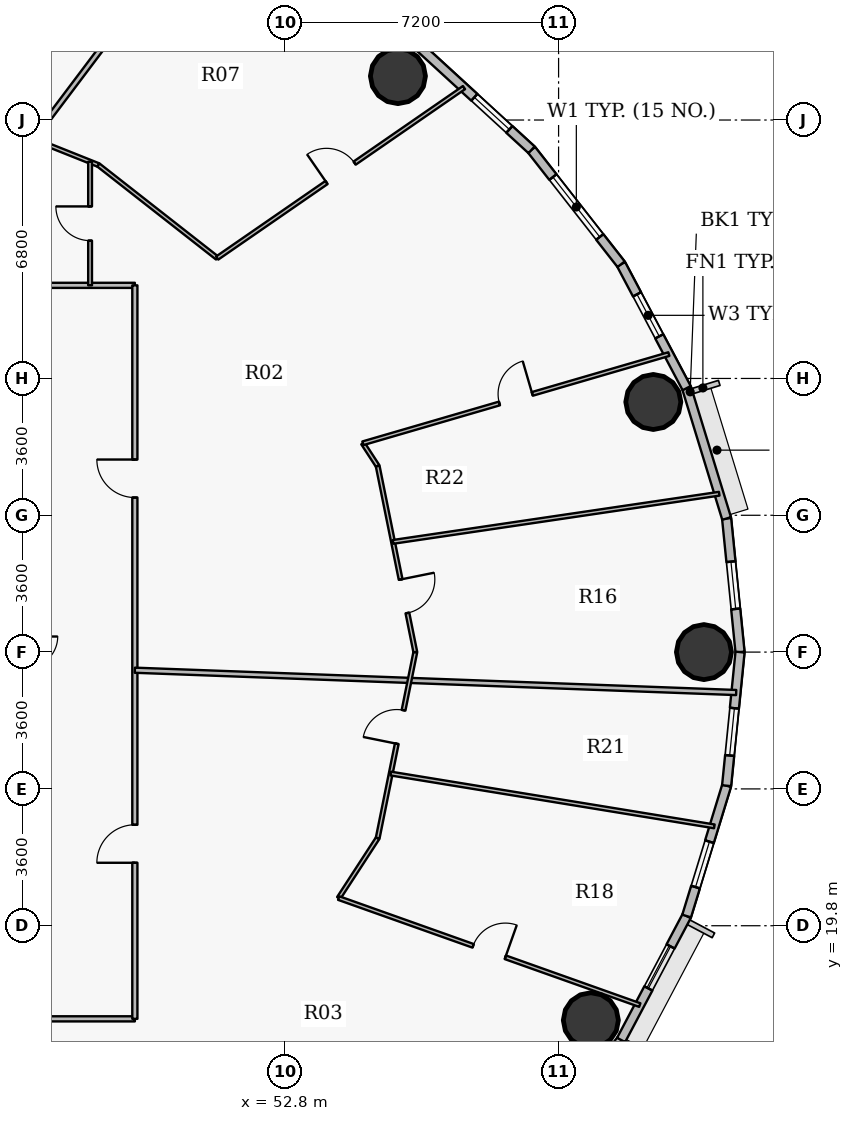
"""IFC4 building model, lengths in metres.
Left out: names, types, materials, properties, quantities, classifications, styles, units other than length and angle.
Written with IfcOpenShell. Run it as: python <this file> out.ifc"""

import sys

from ifc_helpers import new_model, si_unit, direction, frame, frame_2d, origin, origin_2d, place, context, subcontext, project, spatial, rectangle, hollow_circle, extrude, source, transform, mapped, element, fill, save


model = new_model("IFC4")
c1 = context("Model", 3, precision=1e-05, world=origin(), true_north=direction((0.0, 1.0)))
c2 = subcontext(c1, "Body", "Model", "MODEL_VIEW")
j1 = project(units=[si_unit("LENGTHUNIT", "METRE"), si_unit("PLANEANGLEUNIT", "RADIAN")], contexts=[c1])
p1 = place(None, origin())
s1 = spatial("IfcSite", under=j1, at=p1, CompositionType="ELEMENT")
p2 = place(p1, origin())
s2 = spatial("IfcBuilding", under=s1, at=p2, CompositionType="ELEMENT")
p3 = place(p2, frame((0.0, 0.0, 108.45)))
s3 = spatial("IfcBuildingStorey", under=s2, at=p3, CompositionType="ELEMENT", Elevation=108.45)
for number, where, z_axis, x_axis in (
    (1, (63.825, 27.0, 0.0), (0.0, 0.0, 1.0), (1.0, 0.0, 0.0)),
    (2, (62.493, 33.581, 0.0), (0.0, 0.0, 1.0), (1.0, 0.0, 0.0)),
    (3, (55.773, 42.156, 0.0), (0.0, 0.0, 1.0), (1.0, 0.0, 0.0)),
    (4, (60.849, 17.312, 0.0), (0.0, 0.0, 1.0), (1.0, 0.0, 0.0)),
):
    element("IfcColumn", number, at=place(p3, frame(where, z_axis=z_axis, x_axis=x_axis)), inside=s3, PredefinedType="COLUMN", context=c2, shape_type="SweptSolid", body=[
        extrude(hollow_circle(Radius=0.725, WallThickness=0.042, at=origin_2d()), origin(), (0.0, 0.0, 1.0), 3.75),
    ])
p4 = place(p3, frame((64.422, 30.515, 0.0), z_axis=(0.0, 0.0, 1.0), x_axis=(0.099989468229, -0.994988495533, 0.0)))
e5 = element("IfcWall", 5, at=p4, inside=s3, PredefinedType="SOLIDWALL", context=c2, shape_type="SweptSolid", body=[
    extrude(rectangle(XDim=3.533, YDim=0.24, at=frame_2d((1.767, 0.0))), origin(), (0.0, 0.0, 1.0), 3.5),
])
p5 = place(p4, frame((1.142, 0.0, 0.9)))
e6 = element("IfcOpeningElement", 6, at=p5, cuts=e5, PredefinedType="OPENING", context=c2, shape_type="SweptSolid", body=[
    extrude(rectangle(XDim=1.25, YDim=1.65, at=origin_2d()), frame((0.625, 0.13, 0.825), z_axis=(0.0, -1.0, 0.0), x_axis=(1.0, 0.0, 0.0)), (0.0, 0.0, 1.0), 0.26),
])
p6 = place(p3, frame((63.37, 33.945, 0.0), z_axis=(0.0, 0.0, 1.0), x_axis=(0.293124431344, -0.956074300329, 0.0)))
e7 = element("IfcWall", 7, at=p6, inside=s3, PredefinedType="SOLIDWALL", context=c2, shape_type="SweptSolid", body=[
    extrude(rectangle(XDim=3.587, YDim=0.24, at=frame_2d((1.793, 0.0))), origin(), (0.0, 0.0, 1.0), 3.5),
])
p7 = place(p3, frame((61.645, 37.206, 0.0), z_axis=(0.0, 0.0, 1.0), x_axis=(0.467614004126, -0.883932770716, 0.0)))
e8 = element("IfcWall", 8, at=p7, inside=s3, PredefinedType="SOLIDWALL", context=c2, shape_type="SweptSolid", body=[
    extrude(rectangle(XDim=3.689, YDim=0.24, at=frame_2d((1.844, 0.0))), origin(), (0.0, 0.0, 1.0), 3.5),
])
p8 = place(p7, frame((0.896, 0.0, 0.9)))
e9 = element("IfcOpeningElement", 9, at=p8, cuts=e8, PredefinedType="OPENING", context=c2, shape_type="SweptSolid", body=[
    extrude(rectangle(XDim=1.25, YDim=1.65, at=origin_2d()), frame((0.625, 0.13, 0.825), z_axis=(0.0, -1.0, 0.0), x_axis=(1.0, 0.0, 0.0)), (0.0, 0.0, 1.0), 0.26),
])
p9 = place(p3, frame((59.289, 40.217, 0.0), z_axis=(0.0, 0.0, 1.0), x_axis=(0.616272103517, -0.787533297345, 0.0)))
e10 = element("IfcWall", 10, at=p9, inside=s3, PredefinedType="SOLIDWALL", context=c2, shape_type="SweptSolid", body=[
    extrude(rectangle(XDim=3.823, YDim=0.24, at=frame_2d((1.912, 0.0))), origin(), (0.0, 0.0, 1.0), 3.5),
])
p10 = place(p9, frame((0.912, 0.0, 0.9)))
e11 = element("IfcOpeningElement", 11, at=p10, cuts=e10, PredefinedType="OPENING", context=c2, shape_type="SweptSolid", body=[
    extrude(rectangle(XDim=2.0, YDim=1.75, at=origin_2d()), frame((1.0, 0.13, 0.875), z_axis=(0.0, -1.0, 0.0), x_axis=(1.0, 0.0, 0.0)), (0.0, 0.0, 1.0), 0.26),
])
p11 = place(p3, frame((56.358, 42.903, 0.0), z_axis=(0.0, 0.0, 1.0), x_axis=(0.737113356241, -0.675769117414, 0.0)))
e12 = element("IfcWall", 12, at=p11, inside=s3, PredefinedType="SOLIDWALL", context=c2, shape_type="SweptSolid", body=[
    extrude(rectangle(XDim=3.976, YDim=0.24, at=frame_2d((1.988, 0.0))), origin(), (0.0, 0.0, 1.0), 3.5),
])
p12 = place(p11, frame((1.933, 0.0, 0.9)))
e13 = element("IfcOpeningElement", 13, at=p12, cuts=e12, PredefinedType="OPENING", context=c2, shape_type="SweptSolid", body=[
    extrude(rectangle(XDim=1.25, YDim=1.65, at=origin_2d()), frame((0.625, 0.13, 0.825), z_axis=(0.0, -1.0, 0.0), x_axis=(1.0, 0.0, 0.0)), (0.0, 0.0, 1.0), 0.26),
])
p13 = place(p3, frame((61.645, 16.794, 0.0), z_axis=(0.0, 0.0, 1.0), x_axis=(-0.616272103517, -0.787533297345, 0.0)))
e14 = element("IfcWall", 14, at=p13, inside=s3, PredefinedType="SOLIDWALL", context=c2, shape_type="SweptSolid", body=[
    extrude(rectangle(XDim=3.823, YDim=0.24, at=frame_2d((1.912, 0.0))), origin(), (0.0, 0.0, 1.0), 3.5),
])
p14 = place(p3, frame((63.37, 20.055, 0.0), z_axis=(0.0, 0.0, 1.0), x_axis=(-0.467614004126, -0.883932770716, 0.0)))
e15 = element("IfcWall", 15, at=p14, inside=s3, PredefinedType="SOLIDWALL", context=c2, shape_type="SweptSolid", body=[
    extrude(rectangle(XDim=3.689, YDim=0.24, at=frame_2d((1.844, 0.0))), origin(), (0.0, 0.0, 1.0), 3.5),
])
p15 = place(p14, frame((0.904, 0.0, 0.9)))
e16 = element("IfcOpeningElement", 16, at=p15, cuts=e15, PredefinedType="OPENING", context=c2, shape_type="SweptSolid", body=[
    extrude(rectangle(XDim=1.25, YDim=1.65, at=origin_2d()), frame((0.625, 0.13, 0.825), z_axis=(0.0, -1.0, 0.0), x_axis=(1.0, 0.0, 0.0)), (0.0, 0.0, 1.0), 0.26),
])
p16 = place(p3, frame((64.422, 23.485, 0.0), z_axis=(0.0, 0.0, 1.0), x_axis=(-0.293124431344, -0.956074300329, 0.0)))
e17 = element("IfcWall", 17, at=p16, inside=s3, PredefinedType="SOLIDWALL", context=c2, shape_type="SweptSolid", body=[
    extrude(rectangle(XDim=3.587, YDim=0.24, at=frame_2d((1.793, 0.0))), origin(), (0.0, 0.0, 1.0), 3.5),
])
p17 = place(p16, frame((1.541, 0.0, 0.9)))
e18 = element("IfcOpeningElement", 18, at=p17, cuts=e17, PredefinedType="OPENING", context=c2, shape_type="SweptSolid", body=[
    extrude(rectangle(XDim=1.25, YDim=1.65, at=origin_2d()), frame((0.625, 0.13, 0.825), z_axis=(0.0, -1.0, 0.0), x_axis=(1.0, 0.0, 0.0)), (0.0, 0.0, 1.0), 0.26),
])
p18 = place(p3, frame((64.775, 27.0, 0.0), z_axis=(0.0, 0.0, 1.0), x_axis=(-0.099989468229, -0.994988495533, 0.0)))
e19 = element("IfcWall", 19, at=p18, inside=s3, PredefinedType="SOLIDWALL", context=c2, shape_type="SweptSolid", body=[
    extrude(rectangle(XDim=3.533, YDim=0.24, at=frame_2d((1.767, 0.0))), origin(), (0.0, 0.0, 1.0), 3.5),
])
p19 = place(p18, frame((1.484, 0.0, 0.9)))
e20 = element("IfcOpeningElement", 20, at=p19, cuts=e19, PredefinedType="OPENING", context=c2, shape_type="SweptSolid", body=[
    extrude(rectangle(XDim=1.25, YDim=1.65, at=origin_2d()), frame((0.625, 0.13, 0.825), z_axis=(0.0, -1.0, 0.0), x_axis=(1.0, 0.0, 0.0)), (0.0, 0.0, 1.0), 0.26),
])
p20 = place(p3, frame((36.042, 36.65, 0.0), z_axis=(0.0, 0.0, 1.0), x_axis=(1.0, 0.0, 0.0)))
e21 = element("IfcWall", 21, at=p20, inside=s3, PredefinedType="PARTITIONING", context=c2, shape_type="SweptSolid", body=[
    extrude(rectangle(XDim=12.808, YDim=0.135, at=frame_2d((6.404, 0.0))), origin(), (0.0, 0.0, 1.0), 2.935),
])
p21 = place(p20, frame((3.135, 0.0, 0.0)))
e22 = element("IfcOpeningElement", 22, at=p21, cuts=e21, PredefinedType="OPENING", context=c2, shape_type="SweptSolid", body=[
    extrude(rectangle(XDim=1.0, YDim=2.15, at=origin_2d()), frame((0.5, 0.078, 1.075), z_axis=(0.0, -1.0, 0.0), x_axis=(1.0, 0.0, 0.0)), (0.0, 0.0, 1.0), 0.155),
])
p22 = place(p3, frame((38.477, 17.35, 0.0), z_axis=(0.0, 0.0, 1.0), x_axis=(1.0, 0.0, 0.0)))
e23 = element("IfcWall", 23, at=p22, inside=s3, PredefinedType="PARTITIONING", context=c2, shape_type="SweptSolid", body=[
    extrude(rectangle(XDim=10.373, YDim=0.135, at=frame_2d((5.187, 0.0))), origin(), (0.0, 0.0, 1.0), 2.935),
])
p23 = place(p3, frame((42.251, 42.066, 0.0), z_axis=(0.0, 0.0, 1.0), x_axis=(0.9288090756, -0.370558633798, 0.0)))
e24 = element("IfcWall", 24, at=p23, inside=s3, PredefinedType="PARTITIONING", context=c2, shape_type="SweptSolid", body=[
    extrude(rectangle(XDim=6.072, YDim=0.1, at=frame_2d((3.036, 0.0))), origin(), (0.0, 0.0, 1.0), 2.935),
])
p24 = place(p3, frame((43.272, 36.65, 0.0), z_axis=(0.0, 0.0, 1.0), x_axis=(0.601821582461, 0.798630567211, 0.0)))
e25 = element("IfcWall", 25, at=p24, inside=s3, PredefinedType="PARTITIONING", context=c2, shape_type="SweptSolid", body=[
    extrude(rectangle(XDim=12.127, YDim=0.135, at=frame_2d((6.063, 0.0))), origin(), (0.0, 0.0, 1.0), 2.935),
])
p25 = place(p3, frame((47.672, 36.65, 0.0), z_axis=(0.0, 0.0, 1.0), x_axis=(0.0, 1.0, 0.0)))
e26 = element("IfcWall", 26, at=p25, inside=s3, PredefinedType="PARTITIONING", context=c2, shape_type="SweptSolid", body=[
    extrude(rectangle(XDim=3.253, YDim=0.1, at=frame_2d((1.626, 0.0))), origin(), (0.0, 0.0, 1.0), 3.125),
])
p26 = place(p25, frame((1.177, 0.0, 0.0)))
e27 = element("IfcOpeningElement", 27, at=p26, cuts=e26, PredefinedType="OPENING", context=c2, shape_type="SweptSolid", body=[
    extrude(rectangle(XDim=0.9, YDim=2.1, at=origin_2d()), frame((0.45, 0.06, 1.05), z_axis=(0.0, -1.0, 0.0), x_axis=(1.0, 0.0, 0.0)), (0.0, 0.0, 1.0), 0.12),
])
p27 = place(p3, frame((47.891, 39.816, 0.0), z_axis=(0.0, 0.0, 1.0), x_axis=(0.787331052764, -0.616530464254, 0.0)))
e28 = element("IfcWall", 28, at=p27, inside=s3, PredefinedType="PARTITIONING", context=c2, shape_type="SweptSolid", body=[
    extrude(rectangle(XDim=3.969, YDim=0.1, at=frame_2d((1.985, 0.0))), origin(), (0.0, 0.0, 1.0), 2.935),
])
p28 = place(p3, frame((48.85, 17.35, 0.0), z_axis=(0.0, 0.0, 1.0), x_axis=(0.0, 1.0, 0.0)))
e29 = element("IfcWall", 29, at=p28, inside=s3, PredefinedType="PARTITIONING", context=c2, shape_type="SweptSolid", body=[
    extrude(rectangle(XDim=19.3, YDim=0.135, at=frame_2d((9.65, 0.0))), origin(), (0.0, 0.0, 1.0), 2.935),
])
p29 = place(p28, frame((4.107, 0.0, 0.0)))
e30 = element("IfcOpeningElement", 30, at=p29, cuts=e29, PredefinedType="OPENING", context=c2, shape_type="SweptSolid", body=[
    extrude(rectangle(XDim=1.0, YDim=2.15, at=origin_2d()), frame((0.5, 0.078, 1.075), z_axis=(0.0, -1.0, 0.0), x_axis=(1.0, 0.0, 0.0)), (0.0, 0.0, 1.0), 0.155),
])
p30 = place(p28, frame((13.717, 0.0, 0.0)))
e31 = element("IfcOpeningElement", 31, at=p30, cuts=e29, PredefinedType="OPENING", context=c2, shape_type="SweptSolid", body=[
    extrude(rectangle(XDim=1.0, YDim=2.15, at=origin_2d()), frame((0.5, 0.078, 1.075), z_axis=(0.0, -1.0, 0.0), x_axis=(1.0, 0.0, 0.0)), (0.0, 0.0, 1.0), 0.155),
])
p31 = place(p3, frame((48.85, 26.523, 0.0), z_axis=(0.0, 0.0, 1.0), x_axis=(0.999312212169, -0.03708237599, 0.0)))
e32 = element("IfcWall", 32, at=p31, inside=s3, PredefinedType="PARTITIONING", context=c2, shape_type="SweptSolid", body=[
    extrude(rectangle(XDim=15.834, YDim=0.135, at=frame_2d((7.917, 0.0))), origin(), (0.0, 0.0, 1.0), 2.935),
])
p32 = place(p3, frame((51.016, 37.368, 0.0), z_axis=(0.0, 0.0, 1.0), x_axis=(0.822878649823, 0.568217148338, 0.0)))
e33 = element("IfcWall", 33, at=p32, inside=s3, PredefinedType="PARTITIONING", context=c2, shape_type="SweptSolid", body=[
    extrude(rectangle(XDim=7.893, YDim=0.1, at=frame_2d((3.946, 0.0))), origin(), (0.0, 0.0, 1.0), 2.935),
])
p33 = place(p32, frame((3.497, 0.0, 0.0)))
e34 = element("IfcOpeningElement", 34, at=p33, cuts=e33, PredefinedType="OPENING", context=c2, shape_type="SweptSolid", body=[
    extrude(rectangle(XDim=0.9, YDim=2.1, at=origin_2d()), frame((0.45, 0.06, 1.05), z_axis=(0.0, -1.0, 0.0), x_axis=(1.0, 0.0, 0.0)), (0.0, 0.0, 1.0), 0.12),
])
p34 = place(p3, frame((54.214, 20.528, 0.0), z_axis=(0.0, 0.0, 1.0), x_axis=(0.545444312607, 0.838147064568, 0.0)))
e35 = element("IfcWall", 35, at=p34, inside=s3, PredefinedType="PARTITIONING", context=c2, shape_type="SweptSolid", body=[
    extrude(rectangle(XDim=1.882, YDim=0.1, at=frame_2d((0.941, 0.0))), origin(), (0.0, 0.0, 1.0), 3.5),
])
p35 = place(p3, frame((54.214, 20.528, 0.0), z_axis=(0.0, 0.0, 1.0), x_axis=(0.942277402903, -0.334833236073, 0.0)))
e36 = element("IfcWall", 36, at=p35, inside=s3, PredefinedType="PARTITIONING", context=c2, shape_type="SweptSolid", body=[
    extrude(rectangle(XDim=8.408, YDim=0.1, at=frame_2d((4.204, 0.0))), origin(), (0.0, 0.0, 1.0), 2.935),
])
p36 = place(p35, frame((3.754, 0.0, 0.0)))
e37 = element("IfcOpeningElement", 37, at=p36, cuts=e36, PredefinedType="OPENING", context=c2, shape_type="SweptSolid", body=[
    extrude(rectangle(XDim=0.9, YDim=2.1, at=origin_2d()), frame((0.45, 0.06, 1.05), z_axis=(0.0, -1.0, 0.0), x_axis=(1.0, 0.0, 0.0)), (0.0, 0.0, 1.0), 0.12),
])
p37 = place(p3, frame((54.85, 32.494, 0.0), z_axis=(0.0, 0.0, 1.0), x_axis=(0.545288355623, -0.838248536665, 0.0)))
e38 = element("IfcWall", 38, at=p37, inside=s3, PredefinedType="PARTITIONING", context=c2, shape_type="SweptSolid", body=[
    extrude(rectangle(XDim=0.715, YDim=0.1, at=frame_2d((0.357, 0.0))), origin(), (0.0, 0.0, 1.0), 2.935),
])
p38 = place(p3, frame((54.85, 32.494, 0.0), z_axis=(0.0, 0.0, 1.0), x_axis=(0.960056058733, 0.279807727002, 0.0)))
e39 = element("IfcWall", 39, at=p38, inside=s3, PredefinedType="PARTITIONING", context=c2, shape_type="SweptSolid", body=[
    extrude(rectangle(XDim=8.387, YDim=0.1, at=frame_2d((4.193, 0.0))), origin(), (0.0, 0.0, 1.0), 2.935),
])
p39 = place(p38, frame((3.743, 0.0, 0.0)))
e40 = element("IfcOpeningElement", 40, at=p39, cuts=e39, PredefinedType="OPENING", context=c2, shape_type="SweptSolid", body=[
    extrude(rectangle(XDim=0.9, YDim=2.1, at=origin_2d()), frame((0.45, 0.06, 1.05), z_axis=(0.0, -1.0, 0.0), x_axis=(1.0, 0.0, 0.0)), (0.0, 0.0, 1.0), 0.12),
])
p40 = place(p3, frame((55.24, 22.105, 0.0), z_axis=(0.0, 0.0, 1.0), x_axis=(0.198230919145, 0.980155346205, 0.0)))
e41 = element("IfcWall", 41, at=p40, inside=s3, PredefinedType="PARTITIONING", context=c2, shape_type="SweptSolid", body=[
    extrude(rectangle(XDim=4.994, YDim=0.1, at=frame_2d((2.497, 0.0))), origin(), (0.0, 0.0, 1.0), 2.935),
])
p41 = place(p40, frame((2.534, 0.0, 0.0)))
e42 = element("IfcOpeningElement", 42, at=p41, cuts=e41, PredefinedType="OPENING", context=c2, shape_type="SweptSolid", body=[
    extrude(rectangle(XDim=0.9, YDim=2.1, at=origin_2d()), frame((0.45, 0.06, 1.05), z_axis=(0.0, -1.0, 0.0), x_axis=(1.0, 0.0, 0.0)), (0.0, 0.0, 1.0), 0.12),
])
p42 = place(p3, frame((55.24, 31.895, 0.0), z_axis=(0.0, 0.0, 1.0), x_axis=(0.19822142127, -0.980157267049, 0.0)))
e43 = element("IfcWall", 43, at=p42, inside=s3, PredefinedType="PARTITIONING", context=c2, shape_type="SweptSolid", body=[
    extrude(rectangle(XDim=4.994, YDim=0.1, at=frame_2d((2.497, 0.0))), origin(), (0.0, 0.0, 1.0), 2.935),
])
p43 = place(p42, frame((3.045, 0.0, 0.0)))
e44 = element("IfcOpeningElement", 44, at=p43, cuts=e43, PredefinedType="OPENING", context=c2, shape_type="SweptSolid", body=[
    extrude(rectangle(XDim=0.9, YDim=2.1, at=origin_2d()), frame((0.45, 0.06, 1.05), z_axis=(0.0, -1.0, 0.0), x_axis=(1.0, 0.0, 0.0)), (0.0, 0.0, 1.0), 0.12),
])
p44 = place(p3, frame((55.583, 23.804, 0.0), z_axis=(0.0, 0.0, 1.0), x_axis=(0.986943531615, -0.161066648946, 0.0)))
e45 = element("IfcWall", 45, at=p44, inside=s3, PredefinedType="PARTITIONING", context=c2, shape_type="SweptSolid", body=[
    extrude(rectangle(XDim=8.628, YDim=0.1, at=frame_2d((4.314, 0.0))), origin(), (0.0, 0.0, 1.0), 2.935),
])
p45 = place(p3, frame((55.644, 29.9, 0.0), z_axis=(0.0, 0.0, 1.0), x_axis=(0.989279170557, 0.146036716969, 0.0)))
e46 = element("IfcWall", 46, at=p45, inside=s3, PredefinedType="PARTITIONING", context=c2, shape_type="SweptSolid", body=[
    extrude(rectangle(XDim=8.677, YDim=0.1, at=frame_2d((4.338, 0.0))), origin(), (0.0, 0.0, 1.0), 2.935),
])
m1 = source(origin(), c2, "Body", "SweptSolid", [
    extrude(rectangle(XDim=1.25, YDim=1.65, at=origin_2d()), frame((0.625, 0.03, 0.825), z_axis=(0.0, -1.0, 0.0), x_axis=(1.0, 0.0, 0.0)), (0.0, 0.0, 1.0), 0.06),
])
p46 = place(p8, origin())
e47 = element("IfcWindow", 47, at=p46, inside=s3, PartitioningType="SINGLE_PANEL", PredefinedType="WINDOW", context=c2, shape_type="MappedRepresentation", body=[
    mapped(m1, transform((0.0, 0.0, 0.0), x_axis=(1.0, 0.0, 0.0), y_axis=(0.0, 1.0, 0.0), z_axis=(0.0, 0.0, 1.0), scale=1.0)),
])
fill(e9, e47)
m2 = source(origin(), c2, "Body", "SweptSolid", [
    extrude(rectangle(XDim=2.0, YDim=1.75, at=origin_2d()), frame((1.0, 0.03, 0.875), z_axis=(0.0, -1.0, 0.0), x_axis=(1.0, 0.0, 0.0)), (0.0, 0.0, 1.0), 0.06),
])
p47 = place(p10, origin())
e48 = element("IfcWindow", 48, at=p47, inside=s3, PartitioningType="DOUBLE_PANEL_VERTICAL", PredefinedType="WINDOW", context=c2, shape_type="MappedRepresentation", body=[
    mapped(m2, transform((0.0, 0.0, 0.0), x_axis=(1.0, 0.0, 0.0), y_axis=(0.0, 1.0, 0.0), z_axis=(0.0, 0.0, 1.0), scale=1.0)),
])
fill(e11, e48)
p48 = place(p12, origin())
e49 = element("IfcWindow", 49, at=p48, inside=s3, PartitioningType="SINGLE_PANEL", PredefinedType="WINDOW", context=c2, shape_type="MappedRepresentation", body=[
    mapped(m1, transform((0.0, 0.0, 0.0), x_axis=(1.0, 0.0, 0.0), y_axis=(0.0, 1.0, 0.0), z_axis=(0.0, 0.0, 1.0), scale=1.0)),
])
fill(e13, e49)
p49 = place(p15, origin())
e50 = element("IfcWindow", 50, at=p49, inside=s3, PartitioningType="SINGLE_PANEL", PredefinedType="WINDOW", context=c2, shape_type="MappedRepresentation", body=[
    mapped(m1, transform((0.0, 0.0, 0.0), x_axis=(1.0, 0.0, 0.0), y_axis=(0.0, 1.0, 0.0), z_axis=(0.0, 0.0, 1.0), scale=1.0)),
])
fill(e16, e50)
p50 = place(p17, origin())
e51 = element("IfcWindow", 51, at=p50, inside=s3, PartitioningType="SINGLE_PANEL", PredefinedType="WINDOW", context=c2, shape_type="MappedRepresentation", body=[
    mapped(m1, transform((0.0, 0.0, 0.0), x_axis=(1.0, 0.0, 0.0), y_axis=(0.0, 1.0, 0.0), z_axis=(0.0, 0.0, 1.0), scale=1.0)),
])
fill(e18, e51)
p51 = place(p19, origin())
e52 = element("IfcWindow", 52, at=p51, inside=s3, PartitioningType="SINGLE_PANEL", PredefinedType="WINDOW", context=c2, shape_type="MappedRepresentation", body=[
    mapped(m1, transform((0.0, 0.0, 0.0), x_axis=(1.0, 0.0, 0.0), y_axis=(0.0, 1.0, 0.0), z_axis=(0.0, 0.0, 1.0), scale=1.0)),
])
fill(e20, e52)
p52 = place(p5, origin())
e53 = element("IfcWindow", 53, at=p52, inside=s3, PartitioningType="SINGLE_PANEL", PredefinedType="WINDOW", context=c2, shape_type="MappedRepresentation", body=[
    mapped(m1, transform((0.0, 0.0, 0.0), x_axis=(1.0, 0.0, 0.0), y_axis=(0.0, 1.0, 0.0), z_axis=(0.0, 0.0, 1.0), scale=1.0)),
])
fill(e6, e53)
m3 = source(origin(), c2, "Body", "SweptSolid", [
    extrude(rectangle(XDim=1.0, YDim=2.15, at=origin_2d()), frame((0.5, 0.025, 1.075), z_axis=(0.0, -1.0, 0.0), x_axis=(1.0, 0.0, 0.0)), (0.0, 0.0, 1.0), 0.05),
])
p53 = place(p29, origin())
e54 = element("IfcDoor", 54, at=p53, inside=s3, OperationType="SINGLE_SWING_LEFT", PredefinedType="DOOR", context=c2, shape_type="MappedRepresentation", body=[
    mapped(m3, transform((0.0, 0.0, 0.0), x_axis=(1.0, 0.0, 0.0), y_axis=(0.0, 1.0, 0.0), z_axis=(0.0, 0.0, 1.0), scale=1.0)),
])
fill(e30, e54)
m4 = source(origin(), c2, "Body", "SweptSolid", [
    extrude(rectangle(XDim=0.9, YDim=2.1, at=origin_2d()), frame((0.45, 0.025, 1.05), z_axis=(0.0, -1.0, 0.0), x_axis=(1.0, 0.0, 0.0)), (0.0, 0.0, 1.0), 0.05),
])
p54 = place(p36, origin())
e55 = element("IfcDoor", 55, at=p54, inside=s3, OperationType="SINGLE_SWING_RIGHT", PredefinedType="DOOR", context=c2, shape_type="MappedRepresentation", body=[
    mapped(m4, transform((0.0, 0.0, 0.0), x_axis=(1.0, 0.0, 0.0), y_axis=(0.0, 1.0, 0.0), z_axis=(0.0, 0.0, 1.0), scale=1.0)),
])
fill(e37, e55)
p55 = place(p41, origin())
e56 = element("IfcDoor", 56, at=p55, inside=s3, OperationType="SINGLE_SWING_LEFT", PredefinedType="DOOR", context=c2, shape_type="MappedRepresentation", body=[
    mapped(m4, transform((0.0, 0.0, 0.0), x_axis=(1.0, 0.0, 0.0), y_axis=(0.0, 1.0, 0.0), z_axis=(0.0, 0.0, 1.0), scale=1.0)),
])
fill(e42, e56)
p56 = place(p30, origin())
e57 = element("IfcDoor", 57, at=p56, inside=s3, OperationType="SINGLE_SWING_RIGHT", PredefinedType="DOOR", context=c2, shape_type="MappedRepresentation", body=[
    mapped(m3, transform((0.0, 0.0, 0.0), x_axis=(1.0, 0.0, 0.0), y_axis=(0.0, 1.0, 0.0), z_axis=(0.0, 0.0, 1.0), scale=1.0)),
])
fill(e31, e57)
p57 = place(p43, origin())
e58 = element("IfcDoor", 58, at=p57, inside=s3, OperationType="SINGLE_SWING_LEFT", PredefinedType="DOOR", context=c2, shape_type="MappedRepresentation", body=[
    mapped(m4, transform((0.0, 0.0, 0.0), x_axis=(1.0, 0.0, 0.0), y_axis=(0.0, 1.0, 0.0), z_axis=(0.0, 0.0, 1.0), scale=1.0)),
])
fill(e44, e58)
p58 = place(p39, origin())
e59 = element("IfcDoor", 59, at=p58, inside=s3, OperationType="SINGLE_SWING_RIGHT", PredefinedType="DOOR", context=c2, shape_type="MappedRepresentation", body=[
    mapped(m4, transform((0.0, 0.0, 0.0), x_axis=(1.0, 0.0, 0.0), y_axis=(0.0, 1.0, 0.0), z_axis=(0.0, 0.0, 1.0), scale=1.0)),
])
fill(e40, e59)
p59 = place(p33, origin())
e60 = element("IfcDoor", 60, at=p59, inside=s3, OperationType="SINGLE_SWING_LEFT", PredefinedType="DOOR", context=c2, shape_type="MappedRepresentation", body=[
    mapped(m4, transform((0.0, 0.0, 0.0), x_axis=(1.0, 0.0, 0.0), y_axis=(0.0, 1.0, 0.0), z_axis=(0.0, 0.0, 1.0), scale=1.0)),
])
fill(e34, e60)
p60 = place(p26, origin())
e61 = element("IfcDoor", 61, at=p60, inside=s3, OperationType="SINGLE_SWING_RIGHT", PredefinedType="DOOR", context=c2, shape_type="MappedRepresentation", body=[
    mapped(m4, transform((0.0, 0.0, 0.0), x_axis=(1.0, 0.0, 0.0), y_axis=(0.0, 1.0, 0.0), z_axis=(0.0, 0.0, 1.0), scale=1.0)),
])
fill(e27, e61)
save(model, sys.argv[1])
